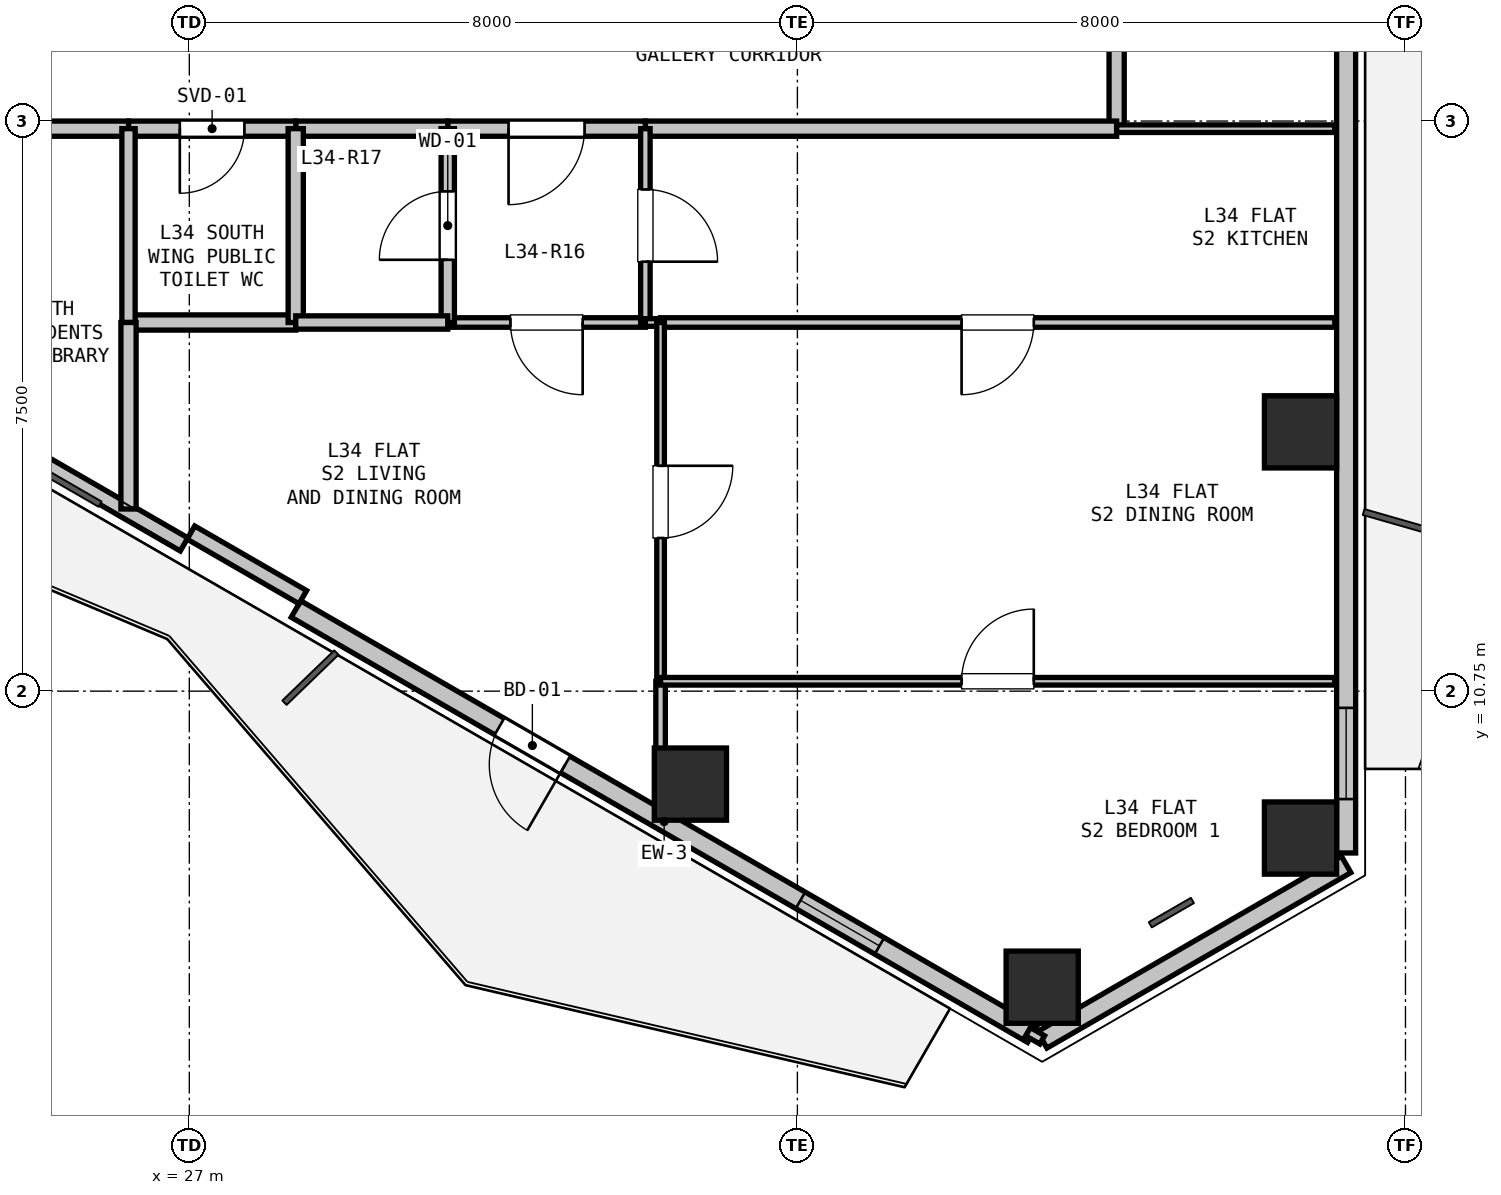
"""IFC4 building model, lengths in metres.
Left out: names, types, materials, properties, quantities, classifications, styles, units other than length and angle.
Written with IfcOpenShell. Run it as: python <this file> out.ifc"""

import sys

from ifc_helpers import new_model, si_unit, direction, frame, frame_2d, origin, origin_2d, place, context, subcontext, project, spatial, rectangle, hollow_rectangle, extrude, element, fill, save


model = new_model("IFC4")
c1 = context("Model", 3, precision=1e-05, world=origin(), true_north=direction((0.0, 1.0)))
c2 = subcontext(c1, "Body", "Model", "MODEL_VIEW")
j1 = project(units=[si_unit("LENGTHUNIT", "METRE"), si_unit("PLANEANGLEUNIT", "RADIAN")], contexts=[c1])
p1 = place(None, origin())
s1 = spatial("IfcSite", under=j1, at=p1, CompositionType="ELEMENT")
p2 = place(p1, origin())
s2 = spatial("IfcBuilding", under=s1, at=p2, CompositionType="ELEMENT")
p3 = place(p2, frame((0.0, 0.0, 124.5)))
s3 = spatial("IfcBuildingStorey", under=s2, at=p3, CompositionType="ELEMENT", Elevation=124.5)
for number, where, z_axis, x_axis in (
    (1, (41.619, 14.161, 0.0), (0.0, 0.0, 1.0), (1.0, 0.0, 0.0)),
    (2, (41.619, 8.817, 0.0), (0.0, 0.0, 1.0), (1.0, 0.0, 0.0)),
    (3, (38.22, 6.855, 0.0), (0.0, 0.0, 1.0), (1.0, 0.0, 0.0)),
    (4, (33.593, 9.527, 0.0), (0.0, 0.0, 1.0), (1.0, 0.0, 0.0)),
):
    element("IfcColumn", number, at=place(p3, frame(where, z_axis=z_axis, x_axis=x_axis)), inside=s3, PredefinedType="COLUMN", context=c2, shape_type="SweptSolid", body=[
        extrude(hollow_rectangle(XDim=0.95, YDim=0.95, WallThickness=0.028, at=origin_2d()), origin(), (0.0, 0.0, 1.0), 3.3),
    ])
p4 = place(p3, frame((42.219, 8.471, 0.0), z_axis=(0.0, 0.0, 1.0), x_axis=(-0.866035021055, -0.499983342029, 0.0)))
e5 = element("IfcWall", 5, at=p4, inside=s3, PredefinedType="SOLIDWALL", context=c2, shape_type="SweptSolid", body=[
    extrude(rectangle(XDim=4.617, YDim=0.25, at=frame_2d((2.309, 0.0))), origin(), (0.0, 0.0, 1.0), 2.68),
])
p5 = place(p3, frame((42.219, 19.807, 0.0), z_axis=(0.0, 0.0, 1.0), x_axis=(0.0, -1.0, 0.0)))
e6 = element("IfcWall", 6, at=p5, inside=s3, PredefinedType="SOLIDWALL", context=c2, shape_type="SweptSolid", body=[
    extrude(rectangle(XDim=11.186, YDim=0.25, at=frame_2d((5.593, 0.0))), origin(), (0.0, 0.0, 1.0), 2.68),
])
p6 = place(p5, frame((9.277, 0.0, 0.9)))
e7 = element("IfcOpeningElement", 7, at=p6, cuts=e6, PredefinedType="OPENING", context=c2, shape_type="SweptSolid", body=[
    extrude(rectangle(XDim=1.2, YDim=1.4, at=frame_2d((0.6, 0.7))), frame((0.0, 0.135, 0.0), z_axis=(0.0, -1.0, 0.0), x_axis=(1.0, 0.0, 0.0)), (0.0, 0.0, 1.0), 0.27),
])
p7 = place(p3, frame((38.091, 6.237, 0.0), z_axis=(0.0, 0.0, 1.0), x_axis=(-0.86602239209, 0.500005216371, 0.0)))
e8 = element("IfcWall", 8, at=p7, inside=s3, PredefinedType="SOLIDWALL", context=c2, shape_type="SweptSolid", body=[
    extrude(rectangle(XDim=11.186, YDim=0.25, at=frame_2d((5.593, 0.0))), origin(), (0.0, 0.0, 1.0), 2.68),
])
p8 = place(p7, frame((7.095, 0.0, 0.0)))
e9 = element("IfcOpeningElement", 9, at=p8, cuts=e8, PredefinedType="OPENING", context=c2, shape_type="SweptSolid", body=[
    extrude(rectangle(XDim=1.0, YDim=2.1, at=frame_2d((0.5, 1.05))), frame((0.0, 0.135, 0.0), z_axis=(0.0, -1.0, 0.0), x_axis=(1.0, 0.0, 0.0)), (0.0, 0.0, 1.0), 0.27),
])
p9 = place(p7, frame((2.322, 0.0, 0.9)))
e10 = element("IfcOpeningElement", 10, at=p9, cuts=e8, PredefinedType="OPENING", context=c2, shape_type="SweptSolid", body=[
    extrude(rectangle(XDim=1.2, YDim=1.4, at=frame_2d((0.6, 0.7))), frame((0.0, 0.135, 0.0), z_axis=(0.0, -1.0, 0.0), x_axis=(1.0, 0.0, 0.0)), (0.0, 0.0, 1.0), 0.27),
])
p10 = place(p3, frame((26.931, 12.68, 0.0), z_axis=(0.0, 0.0, 1.0), x_axis=(-0.866026619769, 0.499997893847, 0.0)))
e11 = element("IfcWall", 11, at=p10, inside=s3, PredefinedType="PARAPET", context=c2, shape_type="SweptSolid", body=[
    extrude(rectangle(XDim=10.486, YDim=0.2, at=frame_2d((5.243, 0.0))), origin(), (0.0, 0.0, 1.0), 0.2),
])
p11 = place(p3, frame((28.493, 11.986, 0.0), z_axis=(0.0, 0.0, 1.0), x_axis=(-0.86605165483, 0.499954529098, 0.0)))
e12 = element("IfcWall", 12, at=p11, inside=s3, PredefinedType="PARAPET", context=c2, shape_type="SweptSolid", body=[
    extrude(rectangle(XDim=1.7, YDim=0.2, at=frame_2d((0.85, 0.0))), origin(), (0.0, 0.0, 1.0), 2.68),
])
p12 = place(p3, frame((39.2, 19.9, 0.0), z_axis=(0.0, 0.0, 1.0), x_axis=(0.0, -1.0, 0.0)))
e13 = element("IfcWall", 13, at=p12, inside=s3, PredefinedType="PARTITIONING", context=c2, shape_type="SweptSolid", body=[
    extrude(rectangle(XDim=1.75, YDim=0.2, at=frame_2d((0.875, 0.0))), origin(), (0.0, 0.0, 1.0), 3.06),
])
p13 = place(p3, frame((39.2, 18.15, 0.0), z_axis=(0.0, 0.0, 1.0), x_axis=(-1.0, 0.0, 0.0)))
e14 = element("IfcWall", 14, at=p13, inside=s3, PredefinedType="PARTITIONING", context=c2, shape_type="SweptSolid", body=[
    extrude(rectangle(XDim=6.2, YDim=0.2, at=frame_2d((3.1, 0.0))), origin(), (0.0, 0.0, 1.0), 2.433),
])
p14 = place(p3, frame((33.0, 18.15, 0.0), z_axis=(0.0, 0.0, 1.0), x_axis=(-1.0, 0.0, 0.0)))
e15 = element("IfcWall", 15, at=p14, inside=s3, PredefinedType="PARTITIONING", context=c2, shape_type="SweptSolid", body=[
    extrude(rectangle(XDim=2.6, YDim=0.2, at=frame_2d((1.3, 0.0))), origin(), (0.0, 0.0, 1.0), 3.06),
])
p15 = place(p14, frame((0.8, 0.0, 0.0)))
e16 = element("IfcOpeningElement", 16, at=p15, cuts=e15, PredefinedType="OPENING", context=c2, shape_type="SweptSolid", body=[
    extrude(rectangle(XDim=1.0, YDim=2.15, at=frame_2d((0.5, 1.075))), frame((0.0, 0.11, 0.0), z_axis=(0.0, -1.0, 0.0), x_axis=(1.0, 0.0, 0.0)), (0.0, 0.0, 1.0), 0.22),
])
p16 = place(p3, frame((30.4, 18.15, 0.0), z_axis=(0.0, 0.0, 1.0), x_axis=(-1.0, 0.0, 0.0)))
e17 = element("IfcWall", 17, at=p16, inside=s3, PredefinedType="PARTITIONING", context=c2, shape_type="SweptSolid", body=[
    extrude(rectangle(XDim=2.0, YDim=0.2, at=frame_2d((1.0, 0.0))), origin(), (0.0, 0.0, 1.0), 3.06),
])
p17 = place(p3, frame((28.4, 18.15, 0.0), z_axis=(0.0, 0.0, 1.0), x_axis=(-1.0, 0.0, 0.0)))
e18 = element("IfcWall", 18, at=p17, inside=s3, PredefinedType="PARTITIONING", context=c2, shape_type="SweptSolid", body=[
    extrude(rectangle(XDim=2.2, YDim=0.2, at=frame_2d((1.1, 0.0))), origin(), (0.0, 0.0, 1.0), 3.06),
])
p18 = place(p17, frame((0.675, 0.0, 0.0)))
e19 = element("IfcOpeningElement", 19, at=p18, cuts=e18, PredefinedType="OPENING", context=c2, shape_type="SweptSolid", body=[
    extrude(rectangle(XDim=0.85, YDim=2.1, at=frame_2d((0.425, 1.05))), frame((0.0, 0.11, 0.0), z_axis=(0.0, -1.0, 0.0), x_axis=(1.0, 0.0, 0.0)), (0.0, 0.0, 1.0), 0.22),
])
p19 = place(p3, frame((26.2, 18.15, 0.0), z_axis=(0.0, 0.0, 1.0), x_axis=(-1.0, 0.0, 0.0)))
e20 = element("IfcWall", 20, at=p19, inside=s3, PredefinedType="PARTITIONING", context=c2, shape_type="SweptSolid", body=[
    extrude(rectangle(XDim=6.2, YDim=0.2, at=frame_2d((3.1, 0.0))), origin(), (0.0, 0.0, 1.0), 2.433),
])
p20 = place(p19, frame((2.2, 0.0, 0.0)))
e21 = element("IfcOpeningElement", 21, at=p20, cuts=e20, PredefinedType="OPENING", context=c2, shape_type="SweptSolid", body=[
    extrude(rectangle(XDim=1.8, YDim=2.2, at=frame_2d((0.9, 1.1))), frame((0.0, 0.11, 0.0), z_axis=(0.0, -1.0, 0.0), x_axis=(1.0, 0.0, 0.0)), (0.0, 0.0, 1.0), 0.22),
])
p21 = place(p3, frame((33.0, 15.6, 0.0), z_axis=(0.0, 0.0, 1.0), x_axis=(-1.0, 0.0, 0.0)))
e22 = element("IfcWall", 22, at=p21, inside=s3, PredefinedType="PARTITIONING", context=c2, shape_type="SweptSolid", body=[
    extrude(rectangle(XDim=2.6, YDim=0.125, at=frame_2d((1.3, 0.0))), origin(), (0.0, 0.0, 1.0), 3.06),
])
p22 = place(p21, frame((0.825, 0.0, 0.0)))
e23 = element("IfcOpeningElement", 23, at=p22, cuts=e22, PredefinedType="OPENING", context=c2, shape_type="SweptSolid", body=[
    extrude(rectangle(XDim=0.95, YDim=2.1, at=frame_2d((0.475, 1.05))), frame((0.0, 0.073, 0.0), z_axis=(0.0, -1.0, 0.0), x_axis=(1.0, 0.0, 0.0)), (0.0, 0.0, 1.0), 0.145),
])
p23 = place(p3, frame((30.4, 15.6, 0.0), z_axis=(0.0, 0.0, 1.0), x_axis=(0.0, 1.0, 0.0)))
e24 = element("IfcWall", 24, at=p23, inside=s3, PredefinedType="PLUMBINGWALL", context=c2, shape_type="SweptSolid", body=[
    extrude(rectangle(XDim=2.55, YDim=0.175, at=frame_2d((1.275, 0.0))), origin(), (0.0, 0.0, 1.0), 3.06),
])
p24 = place(p23, frame((0.825, 0.0, 0.0)))
e25 = element("IfcOpeningElement", 25, at=p24, cuts=e24, PredefinedType="OPENING", context=c2, shape_type="SweptSolid", body=[
    extrude(rectangle(XDim=0.9, YDim=2.1, at=frame_2d((0.45, 1.05))), frame((0.0, 0.097, 0.0), z_axis=(0.0, -1.0, 0.0), x_axis=(1.0, 0.0, 0.0)), (0.0, 0.0, 1.0), 0.195),
])
p25 = place(p3, frame((33.0, 18.15, 0.0), z_axis=(0.0, 0.0, 1.0), x_axis=(0.0, -1.0, 0.0)))
e26 = element("IfcWall", 26, at=p25, inside=s3, PredefinedType="PARTITIONING", context=c2, shape_type="SweptSolid", body=[
    extrude(rectangle(XDim=2.55, YDim=0.125, at=frame_2d((1.275, 0.0))), origin(), (0.0, 0.0, 1.0), 3.06),
])
p26 = place(p25, frame((0.8, 0.0, 0.0)))
e27 = element("IfcOpeningElement", 27, at=p26, cuts=e26, PredefinedType="OPENING", context=c2, shape_type="SweptSolid", body=[
    extrude(rectangle(XDim=0.95, YDim=2.1, at=frame_2d((0.475, 1.05))), frame((0.0, 0.073, 0.0), z_axis=(0.0, -1.0, 0.0), x_axis=(1.0, 0.0, 0.0)), (0.0, 0.0, 1.0), 0.145),
])
p27 = place(p3, frame((28.4, 15.6, 0.0), z_axis=(0.0, 0.0, 1.0), x_axis=(-1.0, 0.0, 0.0)))
e28 = element("IfcWall", 28, at=p27, inside=s3, PredefinedType="PARTITIONING", context=c2, shape_type="SweptSolid", body=[
    extrude(rectangle(XDim=2.2, YDim=0.2, at=frame_2d((1.1, 0.0))), origin(), (0.0, 0.0, 1.0), 2.433),
])
p28 = place(p3, frame((26.2, 15.6, 0.0), z_axis=(0.0, 0.0, 1.0), x_axis=(0.0, 1.0, 0.0)))
e29 = element("IfcWall", 29, at=p28, inside=s3, PredefinedType="PLUMBINGWALL", context=c2, shape_type="SweptSolid", body=[
    extrude(rectangle(XDim=2.55, YDim=0.175, at=frame_2d((1.275, 0.0))), origin(), (0.0, 0.0, 1.0), 2.433),
])
p29 = place(p3, frame((28.4, 18.15, 0.0), z_axis=(0.0, 0.0, 1.0), x_axis=(0.0, -1.0, 0.0)))
e30 = element("IfcWall", 30, at=p29, inside=s3, PredefinedType="PARTITIONING", context=c2, shape_type="SweptSolid", body=[
    extrude(rectangle(XDim=2.55, YDim=0.2, at=frame_2d((1.275, 0.0))), origin(), (0.0, 0.0, 1.0), 3.06),
])
p30 = place(p3, frame((30.4, 15.6, 0.0), z_axis=(0.0, 0.0, 1.0), x_axis=(-1.0, 0.0, 0.0)))
e31 = element("IfcWall", 31, at=p30, inside=s3, PredefinedType="PLUMBINGWALL", context=c2, shape_type="SweptSolid", body=[
    extrude(rectangle(XDim=2.0, YDim=0.175, at=frame_2d((1.0, 0.0))), origin(), (0.0, 0.0, 1.0), 3.06),
])
p31 = place(p3, frame((39.2, 18.15, 0.0), z_axis=(0.0, 0.0, 1.0), x_axis=(1.0, 0.0, 0.0)))
e32 = element("IfcWall", 32, at=p31, inside=s3, PredefinedType="PARTITIONING", context=c2, shape_type="SweptSolid", body=[
    extrude(rectangle(XDim=2.87, YDim=0.1, at=frame_2d((1.435, 0.0))), origin(), (0.0, 0.0, 1.0), 2.365),
])
p32 = place(p3, frame((42.07, 15.6, 0.0), z_axis=(0.0, 0.0, 1.0), x_axis=(-1.0, 0.0, 0.0)))
e33 = element("IfcWall", 33, at=p32, inside=s3, PredefinedType="PARTITIONING", context=c2, shape_type="SweptSolid", body=[
    extrude(rectangle(XDim=8.87, YDim=0.125, at=frame_2d((4.435, 0.0))), origin(), (0.0, 0.0, 1.0), 2.365),
])
p33 = place(p32, frame((3.96, 0.0, 0.0)))
e34 = element("IfcOpeningElement", 34, at=p33, cuts=e33, PredefinedType="OPENING", context=c2, shape_type="SweptSolid", body=[
    extrude(rectangle(XDim=0.95, YDim=2.1, at=frame_2d((0.475, 1.05))), frame((0.0, 0.073, 0.0), z_axis=(0.0, -1.0, 0.0), x_axis=(1.0, 0.0, 0.0)), (0.0, 0.0, 1.0), 0.145),
])
p34 = place(p3, frame((33.2, 15.6, 0.0), z_axis=(0.0, 0.0, 1.0), x_axis=(-1.0, 0.0, 0.0)))
e35 = element("IfcWall", 35, at=p34, inside=s3, PredefinedType="PARTITIONING", context=c2, shape_type="SweptSolid", body=[
    extrude(rectangle(XDim=0.2, YDim=0.1, at=frame_2d((0.1, 0.0))), origin(), (0.0, 0.0, 1.0), 3.06),
])
p35 = place(p3, frame((26.2, 15.6, 0.0), z_axis=(0.0, 0.0, 1.0), x_axis=(0.0, -1.0, 0.0)))
e36 = element("IfcWall", 36, at=p35, inside=s3, PredefinedType="PARTITIONING", context=c2, shape_type="SweptSolid", body=[
    extrude(rectangle(XDim=2.454, YDim=0.2, at=frame_2d((1.227, 0.0))), origin(), (0.0, 0.0, 1.0), 2.365),
])
p36 = place(p3, frame((33.2, 15.6, 0.0), z_axis=(0.0, 0.0, 1.0), x_axis=(0.0, -1.0, 0.0)))
e37 = element("IfcWall", 37, at=p36, inside=s3, PredefinedType="PARTITIONING", context=c2, shape_type="SweptSolid", body=[
    extrude(rectangle(XDim=4.72, YDim=0.1, at=frame_2d((2.36, 0.0))), origin(), (0.0, 0.0, 1.0), 3.06),
])
p37 = place(p36, frame((1.885, 0.0, 0.0)))
e38 = element("IfcOpeningElement", 38, at=p37, cuts=e37, PredefinedType="OPENING", context=c2, shape_type="SweptSolid", body=[
    extrude(rectangle(XDim=0.95, YDim=2.1, at=frame_2d((0.475, 1.05))), frame((0.0, 0.06, 0.0), z_axis=(0.0, -1.0, 0.0), x_axis=(1.0, 0.0, 0.0)), (0.0, 0.0, 1.0), 0.12),
])
p38 = place(p3, frame((33.2, 10.88, 0.0), z_axis=(0.0, 0.0, 1.0), x_axis=(0.0, -1.0, 0.0)))
e39 = element("IfcWall", 39, at=p38, inside=s3, PredefinedType="PARTITIONING", context=c2, shape_type="SweptSolid", body=[
    extrude(rectangle(XDim=1.647, YDim=0.125, at=frame_2d((0.823, 0.0))), origin(), (0.0, 0.0, 1.0), 2.365),
])
p39 = place(p3, frame((33.2, 10.88, 0.0), z_axis=(0.0, 0.0, 1.0), x_axis=(1.0, 0.0, 0.0)))
e40 = element("IfcWall", 40, at=p39, inside=s3, PredefinedType="PARTITIONING", context=c2, shape_type="SweptSolid", body=[
    extrude(rectangle(XDim=8.87, YDim=0.1, at=frame_2d((4.435, 0.0))), origin(), (0.0, 0.0, 1.0), 2.433),
])
p40 = place(p39, frame((3.96, 0.0, 0.0)))
e41 = element("IfcOpeningElement", 41, at=p40, cuts=e40, PredefinedType="OPENING", context=c2, shape_type="SweptSolid", body=[
    extrude(rectangle(XDim=0.95, YDim=2.1, at=frame_2d((0.475, 1.05))), frame((0.0, 0.06, 0.0), z_axis=(0.0, -1.0, 0.0), x_axis=(1.0, 0.0, 0.0)), (0.0, 0.0, 1.0), 0.12),
])
p41 = place(p3, frame((38.221, 6.162, 0.0), z_axis=(0.0, 0.0, 1.0), x_axis=(-0.865581379588, 0.500768285049, 0.0)))
e42 = element("IfcWall", 42, at=p41, inside=s3, PredefinedType="PARTITIONING", context=c2, shape_type="SweptSolid", body=[
    extrude(rectangle(XDim=0.216, YDim=0.125, at=frame_2d((0.108, 0.0))), origin(), (0.0, 0.0, 1.0), 3.06),
])
p42 = place(p6, origin())
e43 = element("IfcWindow", 43, at=p42, inside=s3, PartitioningType="SINGLE_PANEL", PredefinedType="WINDOW", context=c2, shape_type="SweptSolid", body=[
    extrude(rectangle(XDim=1.2, YDim=1.4, at=frame_2d((0.6, 0.7))), frame((0.0, 0.03, 0.0), z_axis=(0.0, -1.0, 0.0), x_axis=(1.0, 0.0, 0.0)), (0.0, 0.0, 1.0), 0.06),
])
fill(e7, e43)
p43 = place(p8, origin())
e44 = element("IfcDoor", 44, at=p43, inside=s3, OperationType="SINGLE_SWING_LEFT", PredefinedType="DOOR", context=c2, shape_type="SweptSolid", body=[
    extrude(rectangle(XDim=1.0, YDim=2.1, at=frame_2d((0.5, 1.05))), frame((0.0, 0.025, 0.0), z_axis=(0.0, -1.0, 0.0), x_axis=(1.0, 0.0, 0.0)), (0.0, 0.0, 1.0), 0.05),
])
fill(e9, e44)
p44 = place(p9, origin())
e45 = element("IfcWindow", 45, at=p44, inside=s3, PartitioningType="SINGLE_PANEL", PredefinedType="WINDOW", context=c2, shape_type="SweptSolid", body=[
    extrude(rectangle(XDim=1.2, YDim=1.4, at=frame_2d((0.6, 0.7))), frame((0.0, 0.03, 0.0), z_axis=(0.0, -1.0, 0.0), x_axis=(1.0, 0.0, 0.0)), (0.0, 0.0, 1.0), 0.06),
])
fill(e10, e45)
p45 = place(p15, origin())
e46 = element("IfcDoor", 46, at=p45, inside=s3, OperationType="SINGLE_SWING_RIGHT", PredefinedType="DOOR", context=c2, shape_type="SweptSolid", body=[
    extrude(rectangle(XDim=1.0, YDim=2.15, at=frame_2d((0.5, 1.075))), frame((0.0, 0.025, 0.0), z_axis=(0.0, -1.0, 0.0), x_axis=(1.0, 0.0, 0.0)), (0.0, 0.0, 1.0), 0.05),
])
fill(e16, e46)
p46 = place(p18, origin())
e47 = element("IfcDoor", 47, at=p46, inside=s3, OperationType="SINGLE_SWING_RIGHT", PredefinedType="DOOR", context=c2, shape_type="SweptSolid", body=[
    extrude(rectangle(XDim=0.85, YDim=2.1, at=frame_2d((0.425, 1.05))), frame((0.0, 0.025, 0.0), z_axis=(0.0, -1.0, 0.0), x_axis=(1.0, 0.0, 0.0)), (0.0, 0.0, 1.0), 0.05),
])
fill(e19, e47)
p47 = place(p24, origin())
e48 = element("IfcDoor", 48, at=p47, inside=s3, OperationType="SINGLE_SWING_LEFT", PredefinedType="DOOR", context=c2, shape_type="SweptSolid", body=[
    extrude(rectangle(XDim=0.9, YDim=2.1, at=frame_2d((0.45, 1.05))), frame((0.0, 0.025, 0.0), z_axis=(0.0, -1.0, 0.0), x_axis=(1.0, 0.0, 0.0)), (0.0, 0.0, 1.0), 0.05),
])
fill(e25, e48)
p48 = place(p26, origin())
e49 = element("IfcDoor", 49, at=p48, inside=s3, OperationType="SINGLE_SWING_RIGHT", PredefinedType="DOOR", context=c2, shape_type="SweptSolid", body=[
    extrude(rectangle(XDim=0.95, YDim=2.1, at=frame_2d((0.475, 1.05))), frame((0.0, 0.025, 0.0), z_axis=(0.0, -1.0, 0.0), x_axis=(1.0, 0.0, 0.0)), (0.0, 0.0, 1.0), 0.05),
])
fill(e27, e49)
p49 = place(p22, origin())
e50 = element("IfcDoor", 50, at=p49, inside=s3, OperationType="SINGLE_SWING_LEFT", PredefinedType="DOOR", context=c2, shape_type="SweptSolid", body=[
    extrude(rectangle(XDim=0.95, YDim=2.1, at=frame_2d((0.475, 1.05))), frame((0.0, 0.025, 0.0), z_axis=(0.0, -1.0, 0.0), x_axis=(1.0, 0.0, 0.0)), (0.0, 0.0, 1.0), 0.05),
])
fill(e23, e50)
p50 = place(p33, origin())
e51 = element("IfcDoor", 51, at=p50, inside=s3, OperationType="SINGLE_SWING_RIGHT", PredefinedType="DOOR", context=c2, shape_type="SweptSolid", body=[
    extrude(rectangle(XDim=0.95, YDim=2.1, at=frame_2d((0.475, 1.05))), frame((0.0, 0.025, 0.0), z_axis=(0.0, -1.0, 0.0), x_axis=(1.0, 0.0, 0.0)), (0.0, 0.0, 1.0), 0.05),
])
fill(e34, e51)
p51 = place(p37, origin())
e52 = element("IfcDoor", 52, at=p51, inside=s3, OperationType="SINGLE_SWING_LEFT", PredefinedType="DOOR", context=c2, shape_type="SweptSolid", body=[
    extrude(rectangle(XDim=0.95, YDim=2.1, at=frame_2d((0.475, 1.05))), frame((0.0, 0.025, 0.0), z_axis=(0.0, -1.0, 0.0), x_axis=(1.0, 0.0, 0.0)), (0.0, 0.0, 1.0), 0.05),
])
fill(e38, e52)
p52 = place(p40, origin())
e53 = element("IfcDoor", 53, at=p52, inside=s3, OperationType="SINGLE_SWING_RIGHT", PredefinedType="DOOR", context=c2, shape_type="SweptSolid", body=[
    extrude(rectangle(XDim=0.95, YDim=2.1, at=frame_2d((0.475, 1.05))), frame((0.0, 0.025, 0.0), z_axis=(0.0, -1.0, 0.0), x_axis=(1.0, 0.0, 0.0)), (0.0, 0.0, 1.0), 0.05),
])
fill(e41, e53)
save(model, sys.argv[1])
